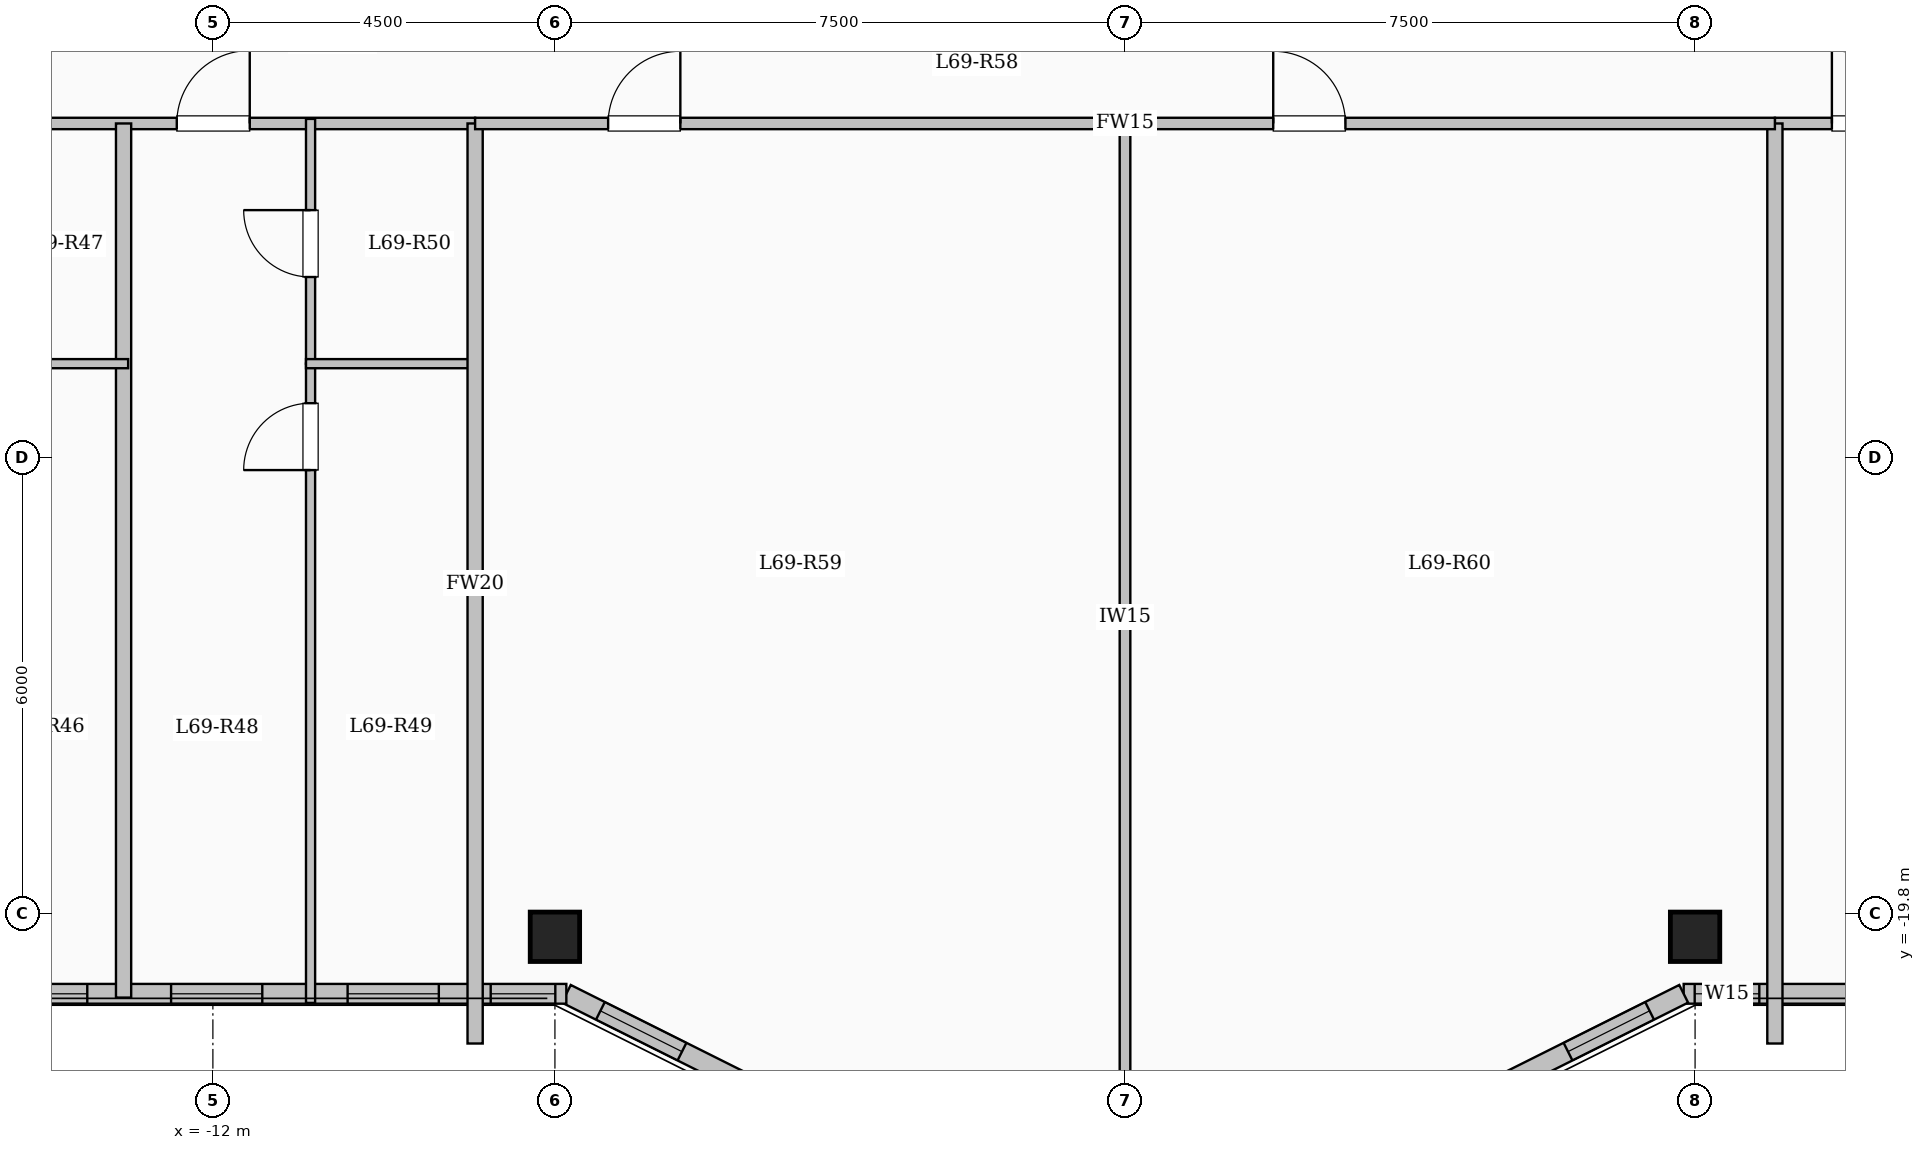
"""IFC4 building model, lengths in metres.
Left out: names, types, materials, properties, quantities, classifications, styles, units other than length and angle.
Written with IfcOpenShell. Run it as: python <this file> out.ifc"""

import sys

from ifc_helpers import new_model, si_unit, direction, frame, frame_2d, origin, origin_2d, place, context, subcontext, project, spatial, rectangle, extrude, element, fill, save


model = new_model("IFC4")
c1 = context("Model", 3, precision=1e-05, world=origin(), true_north=direction((0.0, 1.0)))
c2 = subcontext(c1, "Body", "Model", "MODEL_VIEW")
j1 = project(units=[si_unit("LENGTHUNIT", "METRE"), si_unit("PLANEANGLEUNIT", "RADIAN")], contexts=[c1])
p1 = place(None, origin())
s1 = spatial("IfcSite", under=j1, at=p1, CompositionType="ELEMENT")
p2 = place(p1, origin())
s2 = spatial("IfcBuilding", under=s1, at=p2, CompositionType="ELEMENT")
p3 = place(p2, frame((0.0, 0.0, 254.9)))
s3 = spatial("IfcBuildingStorey", under=s2, at=p3, CompositionType="ELEMENT", Elevation=254.9)
for number, where, z_axis, x_axis in (
    (1, (-7.5, -20.1, 0.0), (0.0, 0.0, 1.0), (1.0, 0.0, 0.0)),
    (2, (7.5, -20.1, 0.0), (0.0, 0.0, 1.0), (1.0, 0.0, 0.0)),
):
    element("IfcColumn", number, at=place(p3, frame(where, z_axis=z_axis, x_axis=x_axis)), inside=s3, PredefinedType="COLUMN", context=c2, shape_type="SweptSolid", body=[
        extrude(rectangle(XDim=0.65, YDim=0.65, at=origin_2d()), origin(), (0.0, 0.0, 1.0), 3.35),
    ])
p4 = place(p3, frame((17.85, -20.85, 0.0), z_axis=(0.0, 0.0, 1.0), x_axis=(-1.0, 0.0, 0.0)))
e3 = element("IfcWall", 3, at=p4, inside=s3, PredefinedType="SOLIDWALL", context=c2, shape_type="SweptSolid", body=[
    extrude(rectangle(XDim=10.5, YDim=0.26, at=frame_2d((5.25, 0.0))), origin(), (0.0, 0.0, 1.0), 3.1),
])
p5 = place(p4, frame((0.489, 0.0, 0.95)))
e4 = element("IfcOpeningElement", 4, at=p5, cuts=e3, PredefinedType="OPENING", context=c2, shape_type="SweptSolid", body=[
    extrude(rectangle(XDim=1.2, YDim=1.5, at=frame_2d((0.6, 0.75))), frame((0.0, 0.14, 0.0), z_axis=(0.0, -1.0, 0.0), x_axis=(1.0, 0.0, 0.0)), (0.0, 0.0, 1.0), 0.28),
])
p6 = place(p4, frame((2.525, 0.0, 0.95)))
e5 = element("IfcOpeningElement", 5, at=p6, cuts=e3, PredefinedType="OPENING", context=c2, shape_type="SweptSolid", body=[
    extrude(rectangle(XDim=1.2, YDim=1.5, at=frame_2d((0.6, 0.75))), frame((0.0, 0.14, 0.0), z_axis=(0.0, -1.0, 0.0), x_axis=(1.0, 0.0, 0.0)), (0.0, 0.0, 1.0), 0.28),
])
p7 = place(p4, frame((4.501, 0.0, 0.95)))
e6 = element("IfcOpeningElement", 6, at=p7, cuts=e3, PredefinedType="OPENING", context=c2, shape_type="SweptSolid", body=[
    extrude(rectangle(XDim=1.2, YDim=1.5, at=frame_2d((0.6, 0.75))), frame((0.0, 0.14, 0.0), z_axis=(0.0, -1.0, 0.0), x_axis=(1.0, 0.0, 0.0)), (0.0, 0.0, 1.0), 0.28),
])
p8 = place(p4, frame((7.0, 0.0, 0.95)))
e7 = element("IfcOpeningElement", 7, at=p8, cuts=e3, PredefinedType="OPENING", context=c2, shape_type="SweptSolid", body=[
    extrude(rectangle(XDim=1.35, YDim=1.55, at=frame_2d((0.675, 0.775))), frame((0.0, 0.14, 0.0), z_axis=(0.0, -1.0, 0.0), x_axis=(1.0, 0.0, 0.0)), (0.0, 0.0, 1.0), 0.28),
])
p9 = place(p4, frame((9.505, 0.0, 0.95)))
e8 = element("IfcOpeningElement", 8, at=p9, cuts=e3, PredefinedType="OPENING", context=c2, shape_type="SweptSolid", body=[
    extrude(rectangle(XDim=0.85, YDim=1.5, at=frame_2d((0.425, 0.75))), frame((0.0, 0.14, 0.0), z_axis=(0.0, -1.0, 0.0), x_axis=(1.0, 0.0, 0.0)), (0.0, 0.0, 1.0), 0.28),
])
p10 = place(p3, frame((7.35, -20.85, 0.0), z_axis=(0.0, 0.0, 1.0), x_axis=(-0.894427191, -0.4472135955, 0.0)))
e9 = element("IfcWall", 9, at=p10, inside=s3, PredefinedType="SOLIDWALL", context=c2, shape_type="SweptSolid", body=[
    extrude(rectangle(XDim=3.354, YDim=0.26, at=frame_2d((1.677, 0.0))), origin(), (0.0, 0.0, 1.0), 3.1),
])
p11 = place(p10, frame((0.501, 0.0, 0.95)))
e10 = element("IfcOpeningElement", 10, at=p11, cuts=e9, PredefinedType="OPENING", context=c2, shape_type="SweptSolid", body=[
    extrude(rectangle(XDim=1.2, YDim=1.5, at=frame_2d((0.6, 0.75))), frame((0.0, 0.14, 0.0), z_axis=(0.0, -1.0, 0.0), x_axis=(1.0, 0.0, 0.0)), (0.0, 0.0, 1.0), 0.28),
])
p12 = place(p3, frame((-4.35, -22.35, 0.0), z_axis=(0.0, 0.0, 1.0), x_axis=(-0.894427191, 0.4472135955, 0.0)))
e11 = element("IfcWall", 11, at=p12, inside=s3, PredefinedType="SOLIDWALL", context=c2, shape_type="SweptSolid", body=[
    extrude(rectangle(XDim=3.354, YDim=0.26, at=frame_2d((1.677, 0.0))), origin(), (0.0, 0.0, 1.0), 3.1),
])
p13 = place(p12, frame((1.653, 0.0, 0.95)))
e12 = element("IfcOpeningElement", 12, at=p13, cuts=e11, PredefinedType="OPENING", context=c2, shape_type="SweptSolid", body=[
    extrude(rectangle(XDim=1.2, YDim=1.5, at=frame_2d((0.6, 0.75))), frame((0.0, 0.14, 0.0), z_axis=(0.0, -1.0, 0.0), x_axis=(1.0, 0.0, 0.0)), (0.0, 0.0, 1.0), 0.28),
])
p14 = place(p3, frame((-7.35, -20.85, 0.0), z_axis=(0.0, 0.0, 1.0), x_axis=(-1.0, 0.0, 0.0)))
e13 = element("IfcWall", 13, at=p14, inside=s3, PredefinedType="SOLIDWALL", context=c2, shape_type="SweptSolid", body=[
    extrude(rectangle(XDim=10.5, YDim=0.26, at=frame_2d((5.25, 0.0))), origin(), (0.0, 0.0, 1.0), 3.1),
])
p15 = place(p14, frame((0.145, 0.0, 0.95)))
e14 = element("IfcOpeningElement", 14, at=p15, cuts=e13, PredefinedType="OPENING", context=c2, shape_type="SweptSolid", body=[
    extrude(rectangle(XDim=0.85, YDim=1.5, at=frame_2d((0.425, 0.75))), frame((0.0, 0.14, 0.0), z_axis=(0.0, -1.0, 0.0), x_axis=(1.0, 0.0, 0.0)), (0.0, 0.0, 1.0), 0.28),
])
p16 = place(p14, frame((1.677, 0.0, 0.95)))
e15 = element("IfcOpeningElement", 15, at=p16, cuts=e13, PredefinedType="OPENING", context=c2, shape_type="SweptSolid", body=[
    extrude(rectangle(XDim=1.2, YDim=1.5, at=frame_2d((0.6, 0.75))), frame((0.0, 0.14, 0.0), z_axis=(0.0, -1.0, 0.0), x_axis=(1.0, 0.0, 0.0)), (0.0, 0.0, 1.0), 0.28),
])
p17 = place(p14, frame((4.0, 0.0, 0.95)))
e16 = element("IfcOpeningElement", 16, at=p17, cuts=e13, PredefinedType="OPENING", context=c2, shape_type="SweptSolid", body=[
    extrude(rectangle(XDim=1.2, YDim=1.5, at=frame_2d((0.6, 0.75))), frame((0.0, 0.14, 0.0), z_axis=(0.0, -1.0, 0.0), x_axis=(1.0, 0.0, 0.0)), (0.0, 0.0, 1.0), 0.28),
])
p18 = place(p14, frame((6.302, 0.0, 0.95)))
e17 = element("IfcOpeningElement", 17, at=p18, cuts=e13, PredefinedType="OPENING", context=c2, shape_type="SweptSolid", body=[
    extrude(rectangle(XDim=1.2, YDim=1.5, at=frame_2d((0.6, 0.75))), frame((0.0, 0.14, 0.0), z_axis=(0.0, -1.0, 0.0), x_axis=(1.0, 0.0, 0.0)), (0.0, 0.0, 1.0), 0.28),
])
p19 = place(p14, frame((8.575, 0.0, 0.95)))
e18 = element("IfcOpeningElement", 18, at=p19, cuts=e13, PredefinedType="OPENING", context=c2, shape_type="SweptSolid", body=[
    extrude(rectangle(XDim=1.2, YDim=1.5, at=frame_2d((0.6, 0.75))), frame((0.0, 0.14, 0.0), z_axis=(0.0, -1.0, 0.0), x_axis=(1.0, 0.0, 0.0)), (0.0, 0.0, 1.0), 0.28),
])
p20 = place(p3, frame((-17.75, -9.4, 0.0), z_axis=(0.0, 0.0, 1.0), x_axis=(1.0, 0.0, 0.0)))
e19 = element("IfcWall", 19, at=p20, inside=s3, PredefinedType="PARTITIONING", context=c2, shape_type="SweptSolid", body=[
    extrude(rectangle(XDim=9.2, YDim=0.15, at=frame_2d((4.6, 0.0))), origin(), (0.0, 0.0, 1.0), 3.1),
])
p21 = place(p20, frame((0.7, 0.0, 0.0)))
e20 = element("IfcOpeningElement", 20, at=p21, cuts=e19, PredefinedType="OPENING", context=c2, shape_type="SweptSolid", body=[
    extrude(rectangle(XDim=0.96, YDim=2.15, at=frame_2d((0.48, 1.075))), frame((0.0, 0.085, 0.0), z_axis=(0.0, -1.0, 0.0), x_axis=(1.0, 0.0, 0.0)), (0.0, 0.0, 1.0), 0.17),
])
p22 = place(p20, frame((5.275, 0.0, 0.0)))
e21 = element("IfcOpeningElement", 21, at=p22, cuts=e19, PredefinedType="OPENING", context=c2, shape_type="SweptSolid", body=[
    extrude(rectangle(XDim=0.96, YDim=2.15, at=frame_2d((0.48, 1.075))), frame((0.0, 0.085, 0.0), z_axis=(0.0, -1.0, 0.0), x_axis=(1.0, 0.0, 0.0)), (0.0, 0.0, 1.0), 0.17),
])
p23 = place(p3, frame((8.55, -9.4, 0.0), z_axis=(0.0, 0.0, 1.0), x_axis=(1.0, 0.0, 0.0)))
e22 = element("IfcWall", 22, at=p23, inside=s3, PredefinedType="PARTITIONING", context=c2, shape_type="SweptSolid", body=[
    extrude(rectangle(XDim=9.2, YDim=0.15, at=frame_2d((4.6, 0.0))), origin(), (0.0, 0.0, 1.0), 3.1),
])
p24 = place(p23, frame((0.75, 0.0, 0.0)))
e23 = element("IfcOpeningElement", 23, at=p24, cuts=e22, PredefinedType="OPENING", context=c2, shape_type="SweptSolid", body=[
    extrude(rectangle(XDim=0.96, YDim=2.15, at=frame_2d((0.48, 1.075))), frame((0.0, 0.085, 0.0), z_axis=(0.0, -1.0, 0.0), x_axis=(1.0, 0.0, 0.0)), (0.0, 0.0, 1.0), 0.17),
])
p25 = place(p3, frame((-13.175, -20.9, 0.0), z_axis=(0.0, 0.0, 1.0), x_axis=(0.0, 1.0, 0.0)))
e24 = element("IfcWall", 24, at=p25, inside=s3, PredefinedType="SOLIDWALL", context=c2, shape_type="SweptSolid", body=[
    extrude(rectangle(XDim=11.5, YDim=0.2, at=frame_2d((5.75, 0.0))), origin(), (0.0, 0.0, 1.0), 3.1),
])
p26 = place(p3, frame((-15.35, -12.56, 0.0), z_axis=(0.0, 0.0, 1.0), x_axis=(1.0, 0.0, 0.0)))
e25 = element("IfcWall", 25, at=p26, inside=s3, PredefinedType="PARTITIONING", context=c2, shape_type="SweptSolid", body=[
    extrude(rectangle(XDim=2.235, YDim=0.12, at=frame_2d((1.118, 0.0))), origin(), (0.0, 0.0, 1.0), 2.785),
])
p27 = place(p3, frame((-10.715, -20.97, 0.0), z_axis=(0.0, 0.0, 1.0), x_axis=(0.0, 1.0, 0.0)))
e26 = element("IfcWall", 26, at=p27, inside=s3, PredefinedType="PARTITIONING", context=c2, shape_type="SweptSolid", body=[
    extrude(rectangle(XDim=8.41, YDim=0.12, at=frame_2d((4.205, 0.0))), origin(), (0.0, 0.0, 1.0), 3.1),
])
p28 = place(p27, frame((7.01, 0.0, 0.0)))
e27 = element("IfcOpeningElement", 27, at=p28, cuts=e26, PredefinedType="OPENING", context=c2, shape_type="SweptSolid", body=[
    extrude(rectangle(XDim=0.88, YDim=2.1, at=frame_2d((0.44, 1.05))), frame((0.0, 0.07, 0.0), z_axis=(0.0, -1.0, 0.0), x_axis=(1.0, 0.0, 0.0)), (0.0, 0.0, 1.0), 0.14),
])
p29 = place(p3, frame((-10.715, -12.56, 0.0), z_axis=(0.0, 0.0, 1.0), x_axis=(0.0, 1.0, 0.0)))
e28 = element("IfcWall", 28, at=p29, inside=s3, PredefinedType="PARTITIONING", context=c2, shape_type="SweptSolid", body=[
    extrude(rectangle(XDim=3.22, YDim=0.12, at=frame_2d((1.61, 0.0))), origin(), (0.0, 0.0, 1.0), 3.1),
])
p30 = place(p29, frame((1.14, 0.0, 0.0)))
e29 = element("IfcOpeningElement", 29, at=p30, cuts=e28, PredefinedType="OPENING", context=c2, shape_type="SweptSolid", body=[
    extrude(rectangle(XDim=0.88, YDim=2.1, at=frame_2d((0.44, 1.05))), frame((0.0, 0.07, 0.0), z_axis=(0.0, -1.0, 0.0), x_axis=(1.0, 0.0, 0.0)), (0.0, 0.0, 1.0), 0.14),
])
p31 = place(p3, frame((-10.775, -12.56, 0.0), z_axis=(0.0, 0.0, 1.0), x_axis=(1.0, 0.0, 0.0)))
e30 = element("IfcWall", 30, at=p31, inside=s3, PredefinedType="PARTITIONING", context=c2, shape_type="SweptSolid", body=[
    extrude(rectangle(XDim=2.235, YDim=0.12, at=frame_2d((1.117, 0.0))), origin(), (0.0, 0.0, 1.0), 2.785),
])
for number, where, z_axis, x_axis in (
    (31, (-8.55, -21.504, 0.0), (0.0, 0.0, 1.0), (0.0, 1.0, 0.0)),
    (32, (8.55, -21.504, 0.0), (0.0, 0.0, 1.0), (0.0, 1.0, 0.0)),
):
    element("IfcWall", number, at=place(p3, frame(where, z_axis=z_axis, x_axis=x_axis)), inside=s3, PredefinedType="SOLIDWALL", context=c2, shape_type="SweptSolid", body=[
        extrude(rectangle(XDim=12.104, YDim=0.2, at=frame_2d((6.052, 0.0))), origin(), (0.0, 0.0, 1.0), 3.1),
    ])
p32 = place(p3, frame((-8.55, -9.4, 0.0), z_axis=(0.0, 0.0, 1.0), x_axis=(1.0, 0.0, 0.0)))
e33 = element("IfcWall", 33, at=p32, inside=s3, PredefinedType="PARTITIONING", context=c2, shape_type="SweptSolid", body=[
    extrude(rectangle(XDim=17.1, YDim=0.15, at=frame_2d((8.55, 0.0))), origin(), (0.0, 0.0, 1.0), 3.1),
])
p33 = place(p32, frame((1.75, 0.0, 0.0)))
e34 = element("IfcOpeningElement", 34, at=p33, cuts=e33, PredefinedType="OPENING", context=c2, shape_type="SweptSolid", body=[
    extrude(rectangle(XDim=0.95, YDim=2.15, at=frame_2d((0.475, 1.075))), frame((0.0, 0.085, 0.0), z_axis=(0.0, -1.0, 0.0), x_axis=(1.0, 0.0, 0.0)), (0.0, 0.0, 1.0), 0.17),
])
p34 = place(p32, frame((10.5, 0.0, 0.0)))
e35 = element("IfcOpeningElement", 35, at=p34, cuts=e33, PredefinedType="OPENING", context=c2, shape_type="SweptSolid", body=[
    extrude(rectangle(XDim=0.95, YDim=2.15, at=frame_2d((0.475, 1.075))), frame((0.0, 0.085, 0.0), z_axis=(0.0, -1.0, 0.0), x_axis=(1.0, 0.0, 0.0)), (0.0, 0.0, 1.0), 0.17),
])
p35 = place(p3, frame((0.0, -22.38, 0.0), z_axis=(0.0, 0.0, 1.0), x_axis=(0.0, 1.0, 0.0)))
e36 = element("IfcWall", 36, at=p35, inside=s3, PredefinedType="PARTITIONING", context=c2, shape_type="SweptSolid", body=[
    extrude(rectangle(XDim=12.98, YDim=0.14, at=frame_2d((6.49, 0.0))), origin(), (0.0, 0.0, 1.0), 3.1),
])
p36 = place(p9, origin())
e37 = element("IfcWindow", 37, at=p36, inside=s3, PartitioningType="SINGLE_PANEL", PredefinedType="WINDOW", context=c2, shape_type="SweptSolid", body=[
    extrude(rectangle(XDim=0.85, YDim=1.5, at=frame_2d((0.425, 0.75))), frame((0.0, 0.03, 0.0), z_axis=(0.0, -1.0, 0.0), x_axis=(1.0, 0.0, 0.0)), (0.0, 0.0, 1.0), 0.06),
])
fill(e8, e37)
p37 = place(p11, origin())
e38 = element("IfcWindow", 38, at=p37, inside=s3, PartitioningType="SINGLE_PANEL", PredefinedType="WINDOW", context=c2, shape_type="SweptSolid", body=[
    extrude(rectangle(XDim=1.2, YDim=1.5, at=frame_2d((0.6, 0.75))), frame((0.0, 0.03, 0.0), z_axis=(0.0, -1.0, 0.0), x_axis=(1.0, 0.0, 0.0)), (0.0, 0.0, 1.0), 0.06),
])
fill(e10, e38)
p38 = place(p13, origin())
e39 = element("IfcWindow", 39, at=p38, inside=s3, PartitioningType="SINGLE_PANEL", PredefinedType="WINDOW", context=c2, shape_type="SweptSolid", body=[
    extrude(rectangle(XDim=1.2, YDim=1.5, at=frame_2d((0.6, 0.75))), frame((0.0, 0.03, 0.0), z_axis=(0.0, -1.0, 0.0), x_axis=(1.0, 0.0, 0.0)), (0.0, 0.0, 1.0), 0.06),
])
fill(e12, e39)
p39 = place(p15, origin())
e40 = element("IfcWindow", 40, at=p39, inside=s3, PartitioningType="SINGLE_PANEL", PredefinedType="WINDOW", context=c2, shape_type="SweptSolid", body=[
    extrude(rectangle(XDim=0.85, YDim=1.5, at=frame_2d((0.425, 0.75))), frame((0.0, 0.03, 0.0), z_axis=(0.0, -1.0, 0.0), x_axis=(1.0, 0.0, 0.0)), (0.0, 0.0, 1.0), 0.06),
])
fill(e14, e40)
p40 = place(p16, origin())
e41 = element("IfcWindow", 41, at=p40, inside=s3, PartitioningType="SINGLE_PANEL", PredefinedType="WINDOW", context=c2, shape_type="SweptSolid", body=[
    extrude(rectangle(XDim=1.2, YDim=1.5, at=frame_2d((0.6, 0.75))), frame((0.0, 0.03, 0.0), z_axis=(0.0, -1.0, 0.0), x_axis=(1.0, 0.0, 0.0)), (0.0, 0.0, 1.0), 0.06),
])
fill(e15, e41)
p41 = place(p17, origin())
e42 = element("IfcWindow", 42, at=p41, inside=s3, PartitioningType="SINGLE_PANEL", PredefinedType="WINDOW", context=c2, shape_type="SweptSolid", body=[
    extrude(rectangle(XDim=1.2, YDim=1.5, at=frame_2d((0.6, 0.75))), frame((0.0, 0.03, 0.0), z_axis=(0.0, -1.0, 0.0), x_axis=(1.0, 0.0, 0.0)), (0.0, 0.0, 1.0), 0.06),
])
fill(e16, e42)
p42 = place(p18, origin())
e43 = element("IfcWindow", 43, at=p42, inside=s3, PartitioningType="SINGLE_PANEL", PredefinedType="WINDOW", context=c2, shape_type="SweptSolid", body=[
    extrude(rectangle(XDim=1.2, YDim=1.5, at=frame_2d((0.6, 0.75))), frame((0.0, 0.03, 0.0), z_axis=(0.0, -1.0, 0.0), x_axis=(1.0, 0.0, 0.0)), (0.0, 0.0, 1.0), 0.06),
])
fill(e17, e43)
p43 = place(p22, origin())
e44 = element("IfcDoor", 44, at=p43, inside=s3, OperationType="SINGLE_SWING_RIGHT", PredefinedType="DOOR", context=c2, shape_type="SweptSolid", body=[
    extrude(rectangle(XDim=0.96, YDim=2.15, at=frame_2d((0.48, 1.075))), frame((0.0, 0.025, 0.0), z_axis=(0.0, -1.0, 0.0), x_axis=(1.0, 0.0, 0.0)), (0.0, 0.0, 1.0), 0.05),
])
fill(e21, e44)
p44 = place(p28, origin())
e45 = element("IfcDoor", 45, at=p44, inside=s3, OperationType="SINGLE_SWING_LEFT", PredefinedType="DOOR", context=c2, shape_type="SweptSolid", body=[
    extrude(rectangle(XDim=0.88, YDim=2.1, at=frame_2d((0.44, 1.05))), frame((0.0, 0.025, 0.0), z_axis=(0.0, -1.0, 0.0), x_axis=(1.0, 0.0, 0.0)), (0.0, 0.0, 1.0), 0.05),
])
fill(e27, e45)
p45 = place(p30, origin())
e46 = element("IfcDoor", 46, at=p45, inside=s3, OperationType="SINGLE_SWING_RIGHT", PredefinedType="DOOR", context=c2, shape_type="SweptSolid", body=[
    extrude(rectangle(XDim=0.88, YDim=2.1, at=frame_2d((0.44, 1.05))), frame((0.0, 0.025, 0.0), z_axis=(0.0, -1.0, 0.0), x_axis=(1.0, 0.0, 0.0)), (0.0, 0.0, 1.0), 0.05),
])
fill(e29, e46)
p46 = place(p24, origin())
e47 = element("IfcDoor", 47, at=p46, inside=s3, OperationType="SINGLE_SWING_LEFT", PredefinedType="DOOR", context=c2, shape_type="SweptSolid", body=[
    extrude(rectangle(XDim=0.96, YDim=2.15, at=frame_2d((0.48, 1.075))), frame((0.0, 0.025, 0.0), z_axis=(0.0, -1.0, 0.0), x_axis=(1.0, 0.0, 0.0)), (0.0, 0.0, 1.0), 0.05),
])
fill(e23, e47)
p47 = place(p33, origin())
e48 = element("IfcDoor", 48, at=p47, inside=s3, OperationType="SINGLE_SWING_RIGHT", PredefinedType="DOOR", context=c2, shape_type="SweptSolid", body=[
    extrude(rectangle(XDim=0.95, YDim=2.15, at=frame_2d((0.475, 1.075))), frame((0.0, 0.025, 0.0), z_axis=(0.0, -1.0, 0.0), x_axis=(1.0, 0.0, 0.0)), (0.0, 0.0, 1.0), 0.05),
])
fill(e34, e48)
p48 = place(p34, origin())
e49 = element("IfcDoor", 49, at=p48, inside=s3, OperationType="SINGLE_SWING_LEFT", PredefinedType="DOOR", context=c2, shape_type="SweptSolid", body=[
    extrude(rectangle(XDim=0.95, YDim=2.15, at=frame_2d((0.475, 1.075))), frame((0.0, 0.025, 0.0), z_axis=(0.0, -1.0, 0.0), x_axis=(1.0, 0.0, 0.0)), (0.0, 0.0, 1.0), 0.05),
])
fill(e35, e49)
save(model, sys.argv[1])
